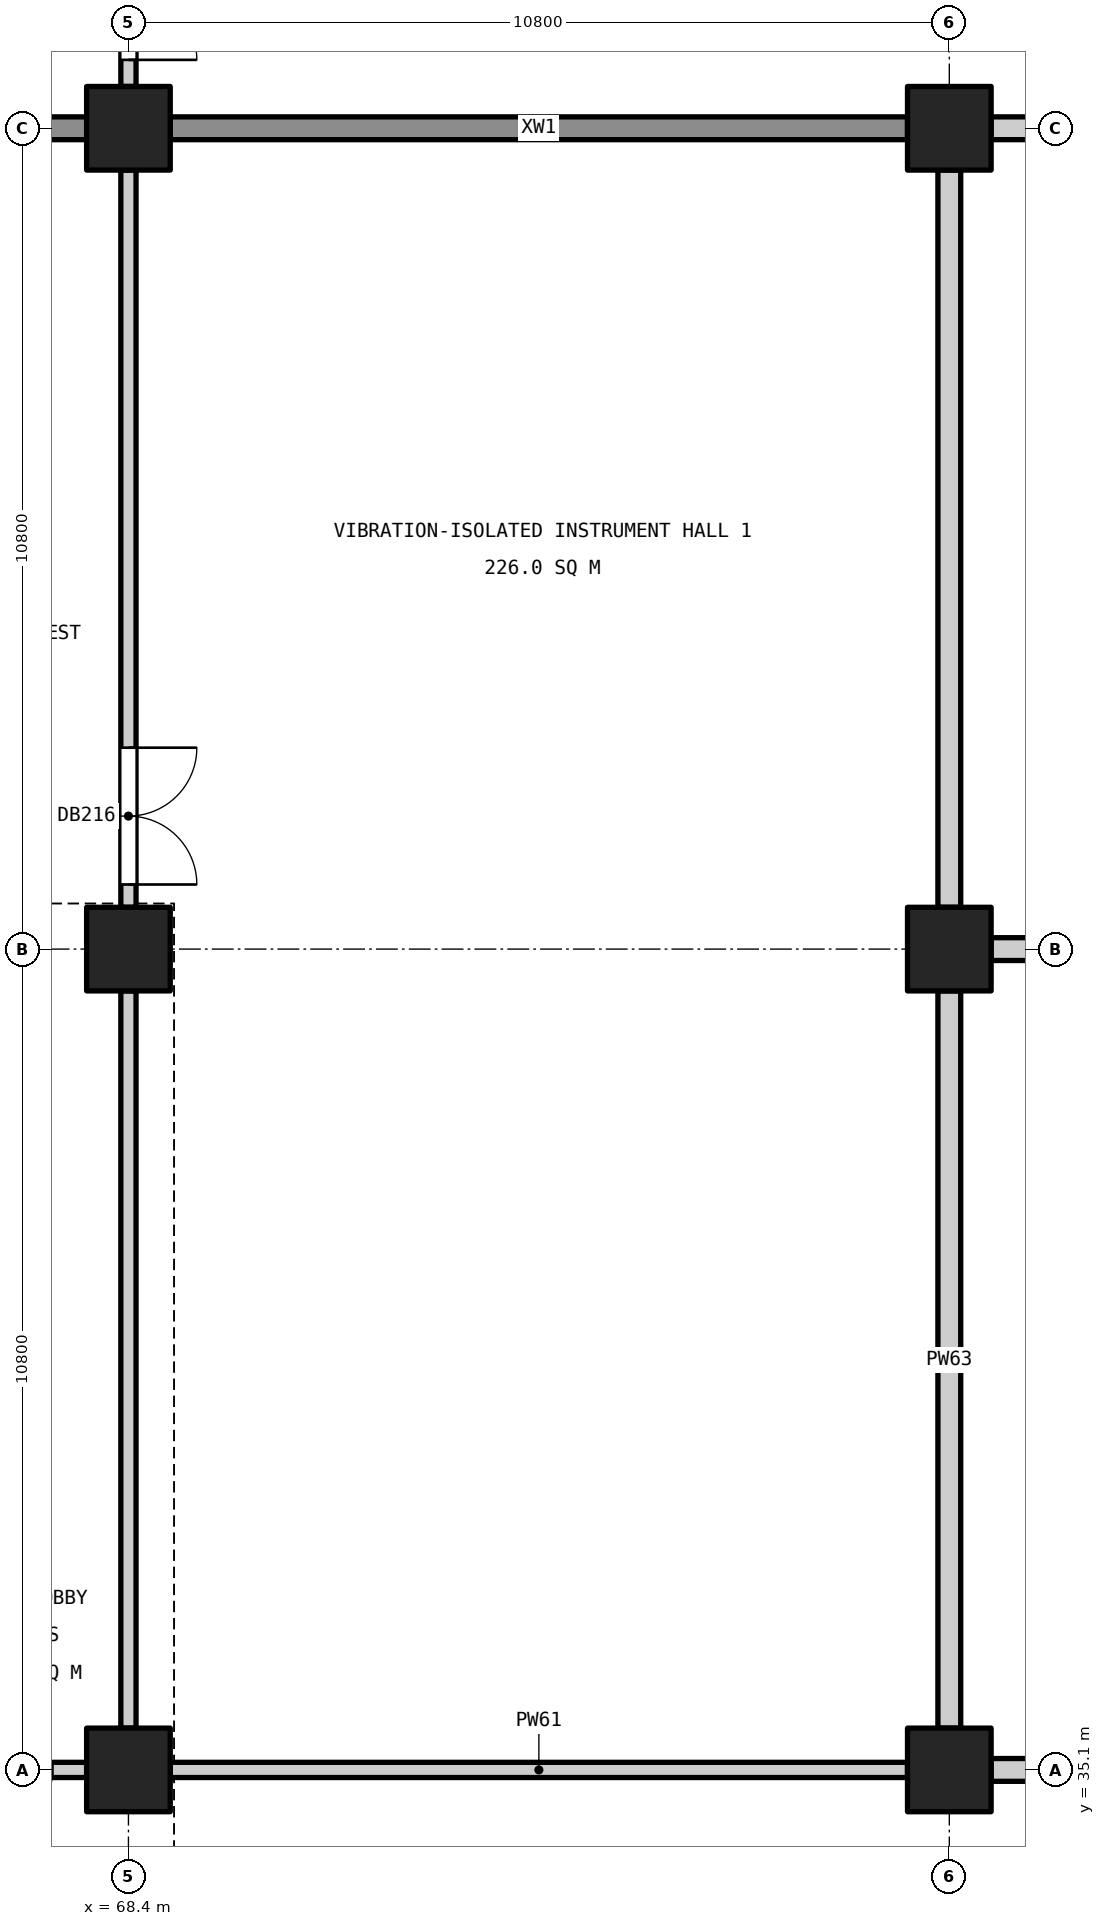
"""IFC4 building model, lengths in metres.
Left out: names, types, materials, properties, quantities, classifications, styles, units other than length and angle.
Written with IfcOpenShell. Run it as: python <this file> out.ifc"""

import sys

from ifc_helpers import new_model, si_unit, direction, frame, frame_2d, origin, origin_2d, place, context, subcontext, project, spatial, rectangle, extrude, element, fill, save


model = new_model("IFC4")
c1 = context("Model", 3, precision=1e-05, world=origin(), true_north=direction((0.0, 1.0)))
c2 = subcontext(c1, "Body", "Model", "MODEL_VIEW")
j1 = project(units=[si_unit("LENGTHUNIT", "METRE"), si_unit("PLANEANGLEUNIT", "RADIAN")], contexts=[c1])
p1 = place(None, origin())
s1 = spatial("IfcSite", under=j1, at=p1, CompositionType="ELEMENT")
p2 = place(p1, origin())
s2 = spatial("IfcBuilding", under=s1, at=p2, CompositionType="ELEMENT")
p3 = place(p2, frame((0.0, 0.0, -9.6)))
s3 = spatial("IfcBuildingStorey", under=s2, at=p3, CompositionType="ELEMENT", Elevation=-9.6)
for number, where, z_axis, x_axis in (
    (1, (68.4, 35.1, 0.0), (0.0, 0.0, 1.0), (1.0, 0.0, 0.0)),
    (2, (68.4, 45.9, 0.0), (0.0, 0.0, 1.0), (1.0, 0.0, 0.0)),
    (3, (68.4, 56.7, 0.0), (0.0, 0.0, 1.0), (1.0, 0.0, 0.0)),
    (4, (79.2, 35.1, 0.0), (0.0, 0.0, 1.0), (1.0, 0.0, 0.0)),
    (5, (79.2, 45.9, 0.0), (0.0, 0.0, 1.0), (1.0, 0.0, 0.0)),
    (6, (79.2, 56.7, 0.0), (0.0, 0.0, 1.0), (1.0, 0.0, 0.0)),
):
    element("IfcColumn", number, at=place(p3, frame(where, z_axis=z_axis, x_axis=x_axis)), inside=s3, PredefinedType="COLUMN", context=c2, shape_type="SweptSolid", body=[
        extrude(rectangle(XDim=1.1, YDim=1.1, at=origin_2d()), origin(), (0.0, 0.0, 1.0), 4.35),
    ])
p4 = place(p3, frame((61.75, 56.7, 0.0), z_axis=(0.0, 0.0, 1.0), x_axis=(1.0, 0.0, 0.0)))
e7 = element("IfcWall", 7, at=p4, inside=s3, PredefinedType="SHEAR", context=c2, shape_type="SweptSolid", body=[
    extrude(rectangle(XDim=6.1, YDim=0.3, at=frame_2d((3.05, 0.0))), origin(), (0.0, 0.0, 1.0), 4.35),
])
p5 = place(p4, frame((2.15, 0.0, 0.0)))
e8 = element("IfcOpeningElement", 8, at=p5, cuts=e7, PredefinedType="OPENING", context=c2, shape_type="SweptSolid", body=[
    extrude(rectangle(XDim=1.8, YDim=2.1, at=frame_2d((0.9, 1.05))), frame((0.0, 0.16, 0.0), z_axis=(0.0, -1.0, 0.0), x_axis=(1.0, 0.0, 0.0)), (0.0, 0.0, 1.0), 0.32),
])
p6 = place(p3, frame((68.95, 56.7, 0.0), z_axis=(0.0, 0.0, 1.0), x_axis=(1.0, 0.0, 0.0)))
e9 = element("IfcWall", 9, at=p6, inside=s3, PredefinedType="SHEAR", context=c2, shape_type="SweptSolid", body=[
    extrude(rectangle(XDim=9.7, YDim=0.3, at=frame_2d((4.85, 0.0))), origin(), (0.0, 0.0, 1.0), 4.35),
])
p7 = place(p3, frame((65.95, 35.1, 0.0), z_axis=(0.0, 0.0, 1.0), x_axis=(1.0, 0.0, 0.0)))
e10 = element("IfcWall", 10, at=p7, inside=s3, PredefinedType="PARTITIONING", context=c2, shape_type="SweptSolid", body=[
    extrude(rectangle(XDim=1.9, YDim=0.2, at=frame_2d((0.95, 0.0))), origin(), (0.0, 0.0, 1.0), 4.35),
])
p8 = place(p7, frame((0.45, 0.0, 0.0)))
e11 = element("IfcOpeningElement", 11, at=p8, cuts=e10, PredefinedType="OPENING", context=c2, shape_type="SweptSolid", body=[
    extrude(rectangle(XDim=1.0, YDim=2.1, at=frame_2d((0.5, 1.05))), frame((0.0, 0.11, 0.0), z_axis=(0.0, -1.0, 0.0), x_axis=(1.0, 0.0, 0.0)), (0.0, 0.0, 1.0), 0.22),
])
p9 = place(p3, frame((68.95, 35.1, 0.0), z_axis=(0.0, 0.0, 1.0), x_axis=(1.0, 0.0, 0.0)))
e12 = element("IfcWall", 12, at=p9, inside=s3, PredefinedType="PARTITIONING", context=c2, shape_type="SweptSolid", body=[
    extrude(rectangle(XDim=9.7, YDim=0.2, at=frame_2d((4.85, 0.0))), origin(), (0.0, 0.0, 1.0), 4.35),
])
p10 = place(p3, frame((79.75, 35.1, 0.0), z_axis=(0.0, 0.0, 1.0), x_axis=(1.0, 0.0, 0.0)))
e13 = element("IfcWall", 13, at=p10, inside=s3, PredefinedType="SOLIDWALL", context=c2, shape_type="SweptSolid", body=[
    extrude(rectangle(XDim=9.725, YDim=0.3, at=frame_2d((4.863, 0.0))), origin(), (0.0, 0.0, 1.0), 4.35),
])
p11 = place(p10, frame((4.4, 0.0, 0.0)))
e14 = element("IfcOpeningElement", 14, at=p11, cuts=e13, PredefinedType="OPENING", context=c2, shape_type="SweptSolid", body=[
    extrude(rectangle(XDim=1.8, YDim=2.1, at=frame_2d((0.9, 1.05))), frame((0.0, 0.16, 0.0), z_axis=(0.0, -1.0, 0.0), x_axis=(1.0, 0.0, 0.0)), (0.0, 0.0, 1.0), 0.32),
])
for number, where, z_axis, x_axis in (
    (15, (79.75, 45.9, 0.0), (0.0, 0.0, 1.0), (1.0, 0.0, 0.0)),
    (16, (79.75, 56.7, 0.0), (0.0, 0.0, 1.0), (1.0, 0.0, 0.0)),
):
    element("IfcWall", number, at=place(p3, frame(where, z_axis=z_axis, x_axis=x_axis)), inside=s3, PredefinedType="SOLIDWALL", context=c2, shape_type="SweptSolid", body=[
        extrude(rectangle(XDim=9.725, YDim=0.3, at=frame_2d((4.863, 0.0))), origin(), (0.0, 0.0, 1.0), 4.35),
    ])
p12 = place(p3, frame((68.4, 35.65, 0.0), z_axis=(0.0, 0.0, 1.0), x_axis=(0.0, 1.0, 0.0)))
e17 = element("IfcWall", 17, at=p12, inside=s3, PredefinedType="PARTITIONING", context=c2, shape_type="SweptSolid", body=[
    extrude(rectangle(XDim=9.7, YDim=0.2, at=frame_2d((4.85, 0.0))), origin(), (0.0, 0.0, 1.0), 4.35),
])
p13 = place(p3, frame((68.4, 46.45, 0.0), z_axis=(0.0, 0.0, 1.0), x_axis=(0.0, 1.0, 0.0)))
e18 = element("IfcWall", 18, at=p13, inside=s3, PredefinedType="PARTITIONING", context=c2, shape_type="SweptSolid", body=[
    extrude(rectangle(XDim=9.7, YDim=0.2, at=frame_2d((4.85, 0.0))), origin(), (0.0, 0.0, 1.0), 4.35),
])
p14 = place(p13, frame((0.3, 0.0, 0.0)))
e19 = element("IfcOpeningElement", 19, at=p14, cuts=e18, PredefinedType="OPENING", context=c2, shape_type="SweptSolid", body=[
    extrude(rectangle(XDim=1.8, YDim=2.1, at=frame_2d((0.9, 1.05))), frame((0.0, 0.11, 0.0), z_axis=(0.0, -1.0, 0.0), x_axis=(1.0, 0.0, 0.0)), (0.0, 0.0, 1.0), 0.22),
])
p15 = place(p3, frame((68.4, 57.25, 0.0), z_axis=(0.0, 0.0, 1.0), x_axis=(0.0, 1.0, 0.0)))
e20 = element("IfcWall", 20, at=p15, inside=s3, PredefinedType="PARTITIONING", context=c2, shape_type="SweptSolid", body=[
    extrude(rectangle(XDim=2.95, YDim=0.2, at=frame_2d((1.475, 0.0))), origin(), (0.0, 0.0, 1.0), 4.35),
])
p16 = place(p15, frame((0.35, 0.0, 0.0)))
e21 = element("IfcOpeningElement", 21, at=p16, cuts=e20, PredefinedType="OPENING", context=c2, shape_type="SweptSolid", body=[
    extrude(rectangle(XDim=1.8, YDim=2.1, at=frame_2d((0.9, 1.05))), frame((0.0, 0.11, 0.0), z_axis=(0.0, -1.0, 0.0), x_axis=(1.0, 0.0, 0.0)), (0.0, 0.0, 1.0), 0.22),
])
p17 = place(p3, frame((79.2, 35.65, 0.0), z_axis=(0.0, 0.0, 1.0), x_axis=(0.0, 1.0, 0.0)))
e22 = element("IfcWall", 22, at=p17, inside=s3, PredefinedType="SOLIDWALL", context=c2, shape_type="SweptSolid", body=[
    extrude(rectangle(XDim=9.7, YDim=0.3, at=frame_2d((4.85, 0.0))), origin(), (0.0, 0.0, 1.0), 4.35),
])
p18 = place(p3, frame((79.2, 46.45, 0.0), z_axis=(0.0, 0.0, 1.0), x_axis=(0.0, 1.0, 0.0)))
e23 = element("IfcWall", 23, at=p18, inside=s3, PredefinedType="SOLIDWALL", context=c2, shape_type="SweptSolid", body=[
    extrude(rectangle(XDim=9.7, YDim=0.3, at=frame_2d((4.85, 0.0))), origin(), (0.0, 0.0, 1.0), 4.35),
])
p19 = place(p14, frame((1.8, 0.0, 0.0), z_axis=(0.0, 0.0, 1.0), x_axis=(-1.0, 0.0, 0.0)))
e24 = element("IfcDoor", 24, at=p19, inside=s3, OperationType="DOUBLE_DOOR_SINGLE_SWING", PredefinedType="DOOR", context=c2, shape_type="SweptSolid", body=[
    extrude(rectangle(XDim=1.8, YDim=2.1, at=frame_2d((0.9, 1.05))), frame((0.0, 0.025, 0.0), z_axis=(0.0, -1.0, 0.0), x_axis=(1.0, 0.0, 0.0)), (0.0, 0.0, 1.0), 0.05),
])
fill(e19, e24)
p20 = place(p16, frame((1.8, 0.0, 0.0), z_axis=(0.0, 0.0, 1.0), x_axis=(-1.0, 0.0, 0.0)))
e25 = element("IfcDoor", 25, at=p20, inside=s3, OperationType="DOUBLE_DOOR_SINGLE_SWING", PredefinedType="DOOR", context=c2, shape_type="SweptSolid", body=[
    extrude(rectangle(XDim=1.8, YDim=2.1, at=frame_2d((0.9, 1.05))), frame((0.0, 0.025, 0.0), z_axis=(0.0, -1.0, 0.0), x_axis=(1.0, 0.0, 0.0)), (0.0, 0.0, 1.0), 0.05),
])
fill(e21, e25)
save(model, sys.argv[1])
